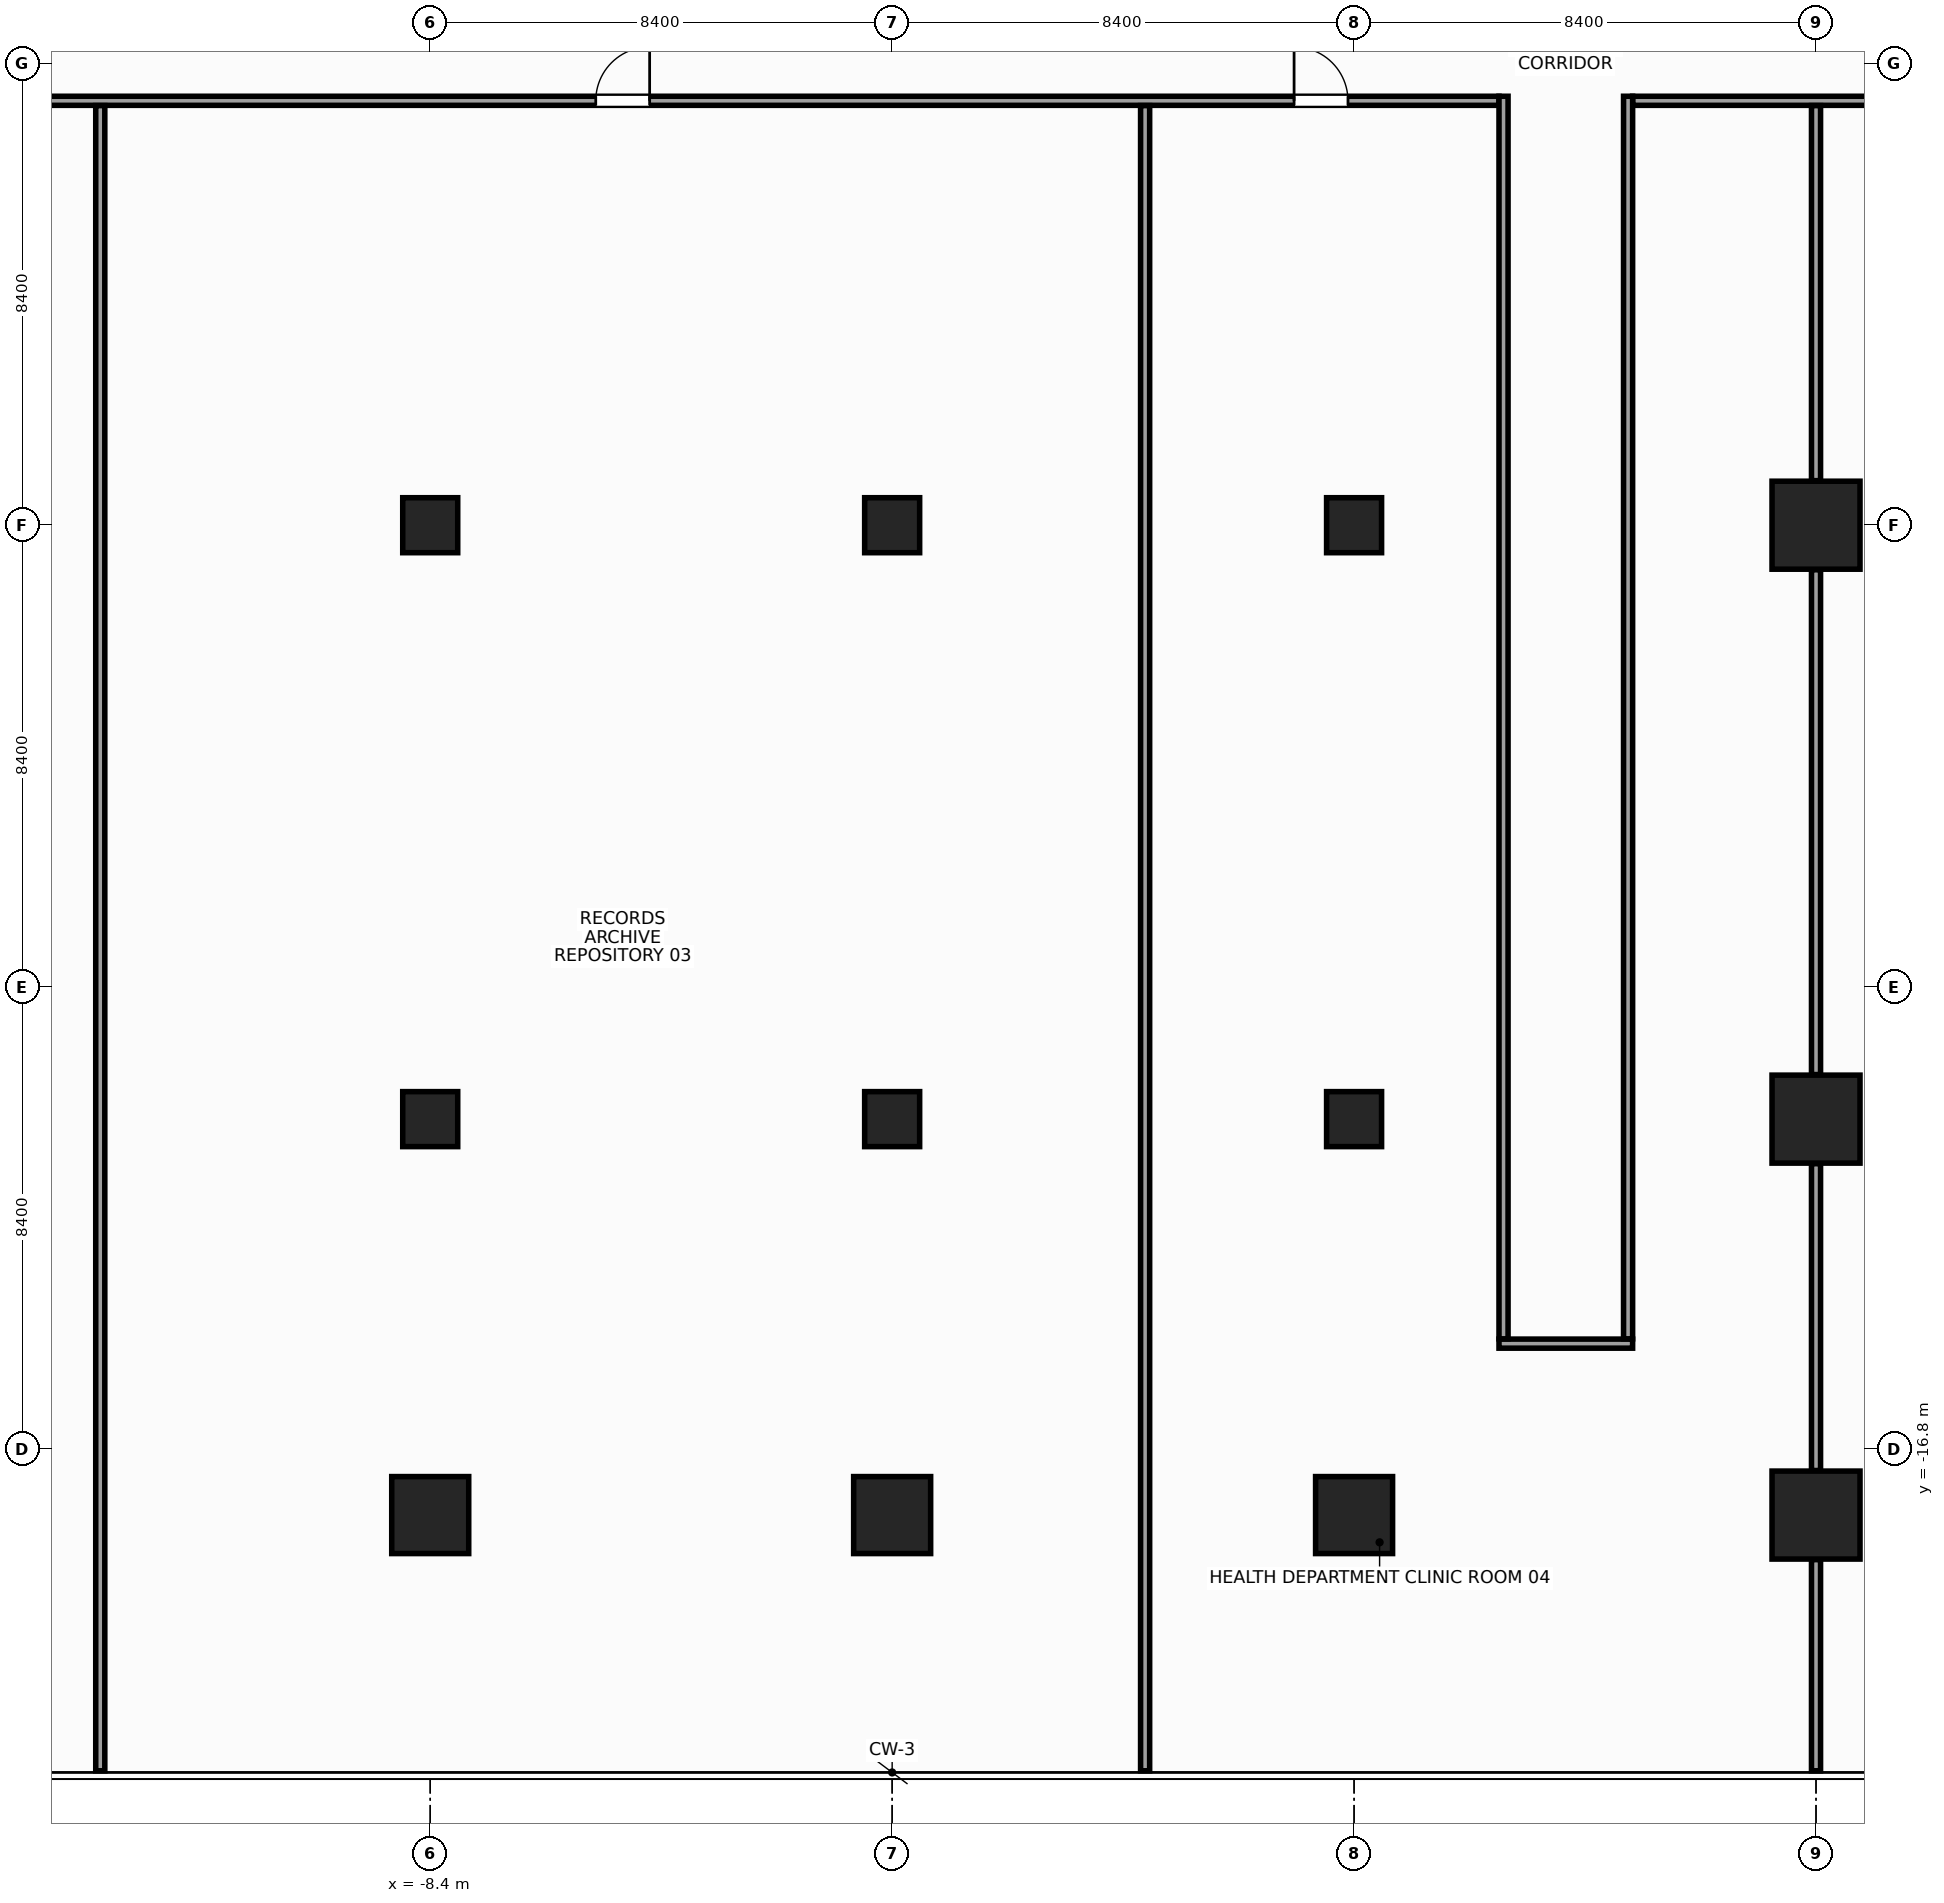
"""IFC4 building model, lengths in metres.
Left out: names, types, materials, properties, quantities, classifications, styles, units other than length and angle.
Written with IfcOpenShell. Run it as: python <this file> out.ifc"""

import sys

from ifc_helpers import new_model, si_unit, direction, frame, frame_2d, origin, origin_2d, place, context, subcontext, project, spatial, rectangle, hollow_rectangle, extrude, source, transform, mapped, element, fill, save


model = new_model("IFC4")
c1 = context("Model", 3, precision=1e-05, world=origin(), true_north=direction((0.0, 1.0)))
c2 = subcontext(c1, "Body", "Model", "MODEL_VIEW")
j1 = project(units=[si_unit("LENGTHUNIT", "METRE"), si_unit("PLANEANGLEUNIT", "RADIAN")], contexts=[c1])
p1 = place(None, origin())
s1 = spatial("IfcSite", under=j1, at=p1, CompositionType="ELEMENT")
p2 = place(p1, origin())
s2 = spatial("IfcBuilding", under=s1, at=p2, CompositionType="ELEMENT")
p3 = place(p2, frame((0.0, 0.0, 164.0)))
s3 = spatial("IfcBuildingStorey", under=s2, at=p3, CompositionType="ELEMENT", Elevation=164.0)
m1 = source(origin(), c2, "Body", "SweptSolid", [
    extrude(rectangle(XDim=1.6, YDim=1.6, at=origin_2d()), origin(), (0.0, 0.0, 1.0), 3.6),
])
for number, where, z_axis, x_axis in (
    (1, (16.8, -18.0, 0.0), (0.0, 0.0, 1.0), (1.0, 0.0, 0.0)),
    (2, (16.8, -10.8, 0.0), (0.0, 0.0, 1.0), (1.0, 0.0, 0.0)),
    (3, (16.8, 0.0, 0.0), (0.0, 0.0, 1.0), (1.0, 0.0, 0.0)),
):
    element("IfcColumn", number, at=place(p3, frame(where, z_axis=z_axis, x_axis=x_axis)), inside=s3, PredefinedType="COLUMN", context=c2, shape_type="MappedRepresentation", body=[
        mapped(m1, transform((0.0, 0.0, 0.0), x_axis=(1.0, 0.0, 0.0), y_axis=(0.0, 1.0, 0.0), z_axis=(0.0, 0.0, 1.0), scale=1.0)),
    ])
m2 = source(origin(), c2, "Body", "SweptSolid", [
    extrude(rectangle(XDim=1.4, YDim=1.4, at=origin_2d()), origin(), (0.0, 0.0, 1.0), 3.6),
])
p4 = place(p3, frame((-8.4, -18.0, 0.0), z_axis=(0.0, 0.0, 1.0), x_axis=(1.0, 0.0, 0.0)))
e4 = element("IfcColumn", 4, at=p4, inside=s3, PredefinedType="COLUMN", context=c2, shape_type="MappedRepresentation", body=[
    mapped(m2, transform((0.0, 0.0, 0.0), x_axis=(1.0, 0.0, 0.0), y_axis=(0.0, 1.0, 0.0), z_axis=(0.0, 0.0, 1.0), scale=1.0)),
])
m3 = source(origin(), c2, "Body", "SweptSolid", [
    extrude(hollow_rectangle(XDim=1.0, YDim=1.0, WallThickness=0.045, at=origin_2d()), origin(), (0.0, 0.0, 1.0), 3.6),
])
for number, where, z_axis, x_axis in (
    (5, (-8.4, 0.0, 0.0), (0.0, 0.0, 1.0), (1.0, 0.0, 0.0)),
    (6, (-8.4, -10.8, 0.0), (0.0, 0.0, 1.0), (1.0, 0.0, 0.0)),
):
    element("IfcColumn", number, at=place(p3, frame(where, z_axis=z_axis, x_axis=x_axis)), inside=s3, PredefinedType="COLUMN", context=c2, shape_type="MappedRepresentation", body=[
        mapped(m3, transform((0.0, 0.0, 0.0), x_axis=(1.0, 0.0, 0.0), y_axis=(0.0, 1.0, 0.0), z_axis=(0.0, 0.0, 1.0), scale=1.0)),
    ])
p5 = place(p3, frame((8.4, -18.0, 0.0), z_axis=(0.0, 0.0, 1.0), x_axis=(1.0, 0.0, 0.0)))
e7 = element("IfcColumn", 7, at=p5, inside=s3, PredefinedType="COLUMN", context=c2, shape_type="MappedRepresentation", body=[
    mapped(m2, transform((0.0, 0.0, 0.0), x_axis=(1.0, 0.0, 0.0), y_axis=(0.0, 1.0, 0.0), z_axis=(0.0, 0.0, 1.0), scale=1.0)),
])
for number, where, z_axis, x_axis in (
    (8, (8.4, 0.0, 0.0), (0.0, 0.0, 1.0), (1.0, 0.0, 0.0)),
    (9, (8.4, -10.8, 0.0), (0.0, 0.0, 1.0), (1.0, 0.0, 0.0)),
):
    element("IfcColumn", number, at=place(p3, frame(where, z_axis=z_axis, x_axis=x_axis)), inside=s3, PredefinedType="COLUMN", context=c2, shape_type="MappedRepresentation", body=[
        mapped(m3, transform((0.0, 0.0, 0.0), x_axis=(1.0, 0.0, 0.0), y_axis=(0.0, 1.0, 0.0), z_axis=(0.0, 0.0, 1.0), scale=1.0)),
    ])
p6 = place(p3, frame((0.0, -18.0, 0.0), z_axis=(0.0, 0.0, 1.0), x_axis=(1.0, 0.0, 0.0)))
e10 = element("IfcColumn", 10, at=p6, inside=s3, PredefinedType="COLUMN", context=c2, shape_type="MappedRepresentation", body=[
    mapped(m2, transform((0.0, 0.0, 0.0), x_axis=(1.0, 0.0, 0.0), y_axis=(0.0, 1.0, 0.0), z_axis=(0.0, 0.0, 1.0), scale=1.0)),
])
m4 = source(origin(), c2, "Body", "SweptSolid", [
    extrude(rectangle(XDim=1.0, YDim=1.0, at=origin_2d()), origin(), (0.0, 0.0, 1.0), 3.6),
])
for number, where, z_axis, x_axis in (
    (11, (0.0, -10.8, 0.0), (0.0, 0.0, 1.0), (1.0, 0.0, 0.0)),
    (12, (0.0, 0.0, 0.0), (0.0, 0.0, 1.0), (1.0, 0.0, 0.0)),
):
    element("IfcColumn", number, at=place(p3, frame(where, z_axis=z_axis, x_axis=x_axis)), inside=s3, PredefinedType="COLUMN", context=c2, shape_type="MappedRepresentation", body=[
        mapped(m4, transform((0.0, 0.0, 0.0), x_axis=(1.0, 0.0, 0.0), y_axis=(0.0, 1.0, 0.0), z_axis=(0.0, 0.0, 1.0), scale=1.0)),
    ])
m5 = source(origin(), c2, "Body", "SweptSolid", [
    extrude(rectangle(XDim=31.6, YDim=0.165, at=frame_2d((15.8, 0.0))), origin(), (0.0, 0.0, 1.0), 2.765),
])
p7 = place(p3, frame((-20.565, 7.718, 0.0), z_axis=(0.0, 0.0, 1.0), x_axis=(1.0, 0.0, 0.0)))
e13 = element("IfcWall", 13, at=p7, inside=s3, PredefinedType="PARTITIONING", context=c2, shape_type="MappedRepresentation", body=[
    mapped(m5, transform((0.0, 0.0, 0.0), x_axis=(1.0, 0.0, 0.0), y_axis=(0.0, 1.0, 0.0), z_axis=(0.0, 0.0, 1.0), scale=1.0)),
])
p8 = place(p7, frame((2.614, 0.0, 0.0)))
e14 = element("IfcOpeningElement", 14, at=p8, cuts=e13, PredefinedType="OPENING", context=c2, shape_type="SweptSolid", body=[
    extrude(rectangle(XDim=0.98, YDim=2.15, at=frame_2d((0.49, 1.075))), frame((0.0, 0.094, 0.0), z_axis=(0.0, -1.0, 0.0), x_axis=(1.0, 0.0, 0.0)), (0.0, 0.0, 1.0), 0.189),
])
p9 = place(p7, frame((15.175, 0.0, 0.0)))
e15 = element("IfcOpeningElement", 15, at=p9, cuts=e13, PredefinedType="OPENING", context=c2, shape_type="SweptSolid", body=[
    extrude(rectangle(XDim=0.98, YDim=2.15, at=frame_2d((0.49, 1.075))), frame((0.0, 0.094, 0.0), z_axis=(0.0, -1.0, 0.0), x_axis=(1.0, 0.0, 0.0)), (0.0, 0.0, 1.0), 0.189),
])
p10 = place(p7, frame((27.874, 0.0, 0.0)))
e16 = element("IfcOpeningElement", 16, at=p10, cuts=e13, PredefinedType="OPENING", context=c2, shape_type="SweptSolid", body=[
    extrude(rectangle(XDim=0.98, YDim=2.15, at=frame_2d((0.49, 1.075))), frame((0.0, 0.094, 0.0), z_axis=(0.0, -1.0, 0.0), x_axis=(1.0, 0.0, 0.0)), (0.0, 0.0, 1.0), 0.189),
])
m6 = source(origin(), c2, "Body", "SweptSolid", [
    extrude(rectangle(XDim=7.1, YDim=0.165, at=frame_2d((3.55, 0.0))), origin(), (0.0, 0.0, 1.0), 2.765),
])
p11 = place(p3, frame((13.465, 7.718, 0.0), z_axis=(0.0, 0.0, 1.0), x_axis=(1.0, 0.0, 0.0)))
e17 = element("IfcWall", 17, at=p11, inside=s3, PredefinedType="PARTITIONING", context=c2, shape_type="MappedRepresentation", body=[
    mapped(m6, transform((0.0, 0.0, 0.0), x_axis=(1.0, 0.0, 0.0), y_axis=(0.0, 1.0, 0.0), z_axis=(0.0, 0.0, 1.0), scale=1.0)),
])
p12 = place(p11, frame((4.706, 0.0, 0.0)))
e18 = element("IfcOpeningElement", 18, at=p12, cuts=e17, PredefinedType="OPENING", context=c2, shape_type="SweptSolid", body=[
    extrude(rectangle(XDim=0.98, YDim=2.15, at=frame_2d((0.49, 1.075))), frame((0.0, 0.094, 0.0), z_axis=(0.0, -1.0, 0.0), x_axis=(1.0, 0.0, 0.0)), (0.0, 0.0, 1.0), 0.189),
])
m7 = source(origin(), c2, "Body", "SweptSolid", [
    extrude(rectangle(XDim=2.43, YDim=0.165, at=frame_2d((1.215, 0.0))), origin(), (0.0, 0.0, 1.0), 3.38),
])
p13 = place(p3, frame((11.035, -14.883, 0.0), z_axis=(0.0, 0.0, 1.0), x_axis=(1.0, 0.0, 0.0)))
e19 = element("IfcWall", 19, at=p13, inside=s3, PredefinedType="PARTITIONING", context=c2, shape_type="MappedRepresentation", body=[
    mapped(m7, transform((0.0, 0.0, 0.0), x_axis=(1.0, 0.0, 0.0), y_axis=(0.0, 1.0, 0.0), z_axis=(0.0, 0.0, 1.0), scale=1.0)),
])
m8 = source(origin(), c2, "Body", "SweptSolid", [
    extrude(rectangle(XDim=22.595, YDim=0.165, at=frame_2d((11.297, 0.0))), origin(), (0.0, 0.0, 1.0), 2.665),
])
for number, where, z_axis, x_axis in (
    (20, (11.117, -14.795, 0.0), (0.0, 0.0, 1.0), (0.0, 1.0, 0.0)),
    (21, (13.383, -14.795, 0.0), (0.0, 0.0, 1.0), (0.0, 1.0, 0.0)),
):
    element("IfcWall", number, at=place(p3, frame(where, z_axis=z_axis, x_axis=x_axis)), inside=s3, PredefinedType="PARTITIONING", context=c2, shape_type="MappedRepresentation", body=[
        mapped(m8, transform((0.0, 0.0, 0.0), x_axis=(1.0, 0.0, 0.0), y_axis=(0.0, 1.0, 0.0), z_axis=(0.0, 0.0, 1.0), scale=1.0)),
    ])
m9 = source(origin(), c2, "Body", "SweptSolid", [
    extrude(rectangle(XDim=30.28, YDim=0.165, at=frame_2d((15.14, 0.0))), origin(), (0.0, 0.0, 1.0), 2.665),
])
for number, where, z_axis, x_axis in (
    (22, (-14.4, -22.65, 0.0), (0.0, 0.0, 1.0), (0.0, 1.0, 0.0)),
    (23, (4.6, -22.65, 0.0), (0.0, 0.0, 1.0), (0.0, 1.0, 0.0)),
):
    element("IfcWall", number, at=place(p3, frame(where, z_axis=z_axis, x_axis=x_axis)), inside=s3, PredefinedType="PARTITIONING", context=c2, shape_type="MappedRepresentation", body=[
        mapped(m9, transform((0.0, 0.0, 0.0), x_axis=(1.0, 0.0, 0.0), y_axis=(0.0, 1.0, 0.0), z_axis=(0.0, 0.0, 1.0), scale=1.0)),
    ])
m10 = source(origin(), c2, "Body", "SweptSolid", [
    extrude(rectangle(XDim=3.84, YDim=0.165, at=frame_2d((1.92, 0.0))), origin(), (0.0, 0.0, 1.0), 3.38),
])
p14 = place(p3, frame((16.8, -22.65, 0.0), z_axis=(0.0, 0.0, 1.0), x_axis=(0.0, 1.0, 0.0)))
e24 = element("IfcWall", 24, at=p14, inside=s3, PredefinedType="PARTITIONING", context=c2, shape_type="MappedRepresentation", body=[
    mapped(m10, transform((0.0, 0.0, 0.0), x_axis=(1.0, 0.0, 0.0), y_axis=(0.0, 1.0, 0.0), z_axis=(0.0, 0.0, 1.0), scale=1.0)),
])
m11 = source(origin(), c2, "Body", "SweptSolid", [
    extrude(rectangle(XDim=5.58, YDim=0.165, at=frame_2d((2.79, 0.0))), origin(), (0.0, 0.0, 1.0), 2.965),
])
p15 = place(p3, frame((16.8, -17.19, 0.0), z_axis=(0.0, 0.0, 1.0), x_axis=(0.0, 1.0, 0.0)))
e25 = element("IfcWall", 25, at=p15, inside=s3, PredefinedType="PARTITIONING", context=c2, shape_type="MappedRepresentation", body=[
    mapped(m11, transform((0.0, 0.0, 0.0), x_axis=(1.0, 0.0, 0.0), y_axis=(0.0, 1.0, 0.0), z_axis=(0.0, 0.0, 1.0), scale=1.0)),
])
m12 = source(origin(), c2, "Body", "SweptSolid", [
    extrude(rectangle(XDim=9.18, YDim=0.165, at=frame_2d((4.59, 0.0))), origin(), (0.0, 0.0, 1.0), 2.765),
])
p16 = place(p3, frame((16.8, -9.99, 0.0), z_axis=(0.0, 0.0, 1.0), x_axis=(0.0, 1.0, 0.0)))
e26 = element("IfcWall", 26, at=p16, inside=s3, PredefinedType="PARTITIONING", context=c2, shape_type="MappedRepresentation", body=[
    mapped(m12, transform((0.0, 0.0, 0.0), x_axis=(1.0, 0.0, 0.0), y_axis=(0.0, 1.0, 0.0), z_axis=(0.0, 0.0, 1.0), scale=1.0)),
])
m13 = source(origin(), c2, "Body", "SweptSolid", [
    extrude(rectangle(XDim=6.82, YDim=0.165, at=frame_2d((3.41, 0.0))), origin(), (0.0, 0.0, 1.0), 2.765),
])
p17 = place(p3, frame((16.8, 0.81, 0.0), z_axis=(0.0, 0.0, 1.0), x_axis=(0.0, 1.0, 0.0)))
e27 = element("IfcWall", 27, at=p17, inside=s3, PredefinedType="PARTITIONING", context=c2, shape_type="MappedRepresentation", body=[
    mapped(m13, transform((0.0, 0.0, 0.0), x_axis=(1.0, 0.0, 0.0), y_axis=(0.0, 1.0, 0.0), z_axis=(0.0, 0.0, 1.0), scale=1.0)),
])
m14 = source(origin(), c2, "Body", "SweptSolid", [
    extrude(rectangle(XDim=0.98, YDim=2.15, at=frame_2d((0.49, 1.075))), frame((0.0, 0.025, 0.0), z_axis=(0.0, -1.0, 0.0), x_axis=(1.0, 0.0, 0.0)), (0.0, 0.0, 1.0), 0.05),
])
p18 = place(p9, origin())
e28 = element("IfcDoor", 28, at=p18, inside=s3, OperationType="SINGLE_SWING_RIGHT", PredefinedType="DOOR", context=c2, shape_type="MappedRepresentation", body=[
    mapped(m14, transform((0.0, 0.0, 0.0), x_axis=(1.0, 0.0, 0.0), y_axis=(0.0, 1.0, 0.0), z_axis=(0.0, 0.0, 1.0), scale=1.0)),
])
fill(e15, e28)
p19 = place(p10, origin())
e29 = element("IfcDoor", 29, at=p19, inside=s3, OperationType="SINGLE_SWING_LEFT", PredefinedType="DOOR", context=c2, shape_type="MappedRepresentation", body=[
    mapped(m14, transform((0.0, 0.0, 0.0), x_axis=(1.0, 0.0, 0.0), y_axis=(0.0, 1.0, 0.0), z_axis=(0.0, 0.0, 1.0), scale=1.0)),
])
fill(e16, e29)
save(model, sys.argv[1])
